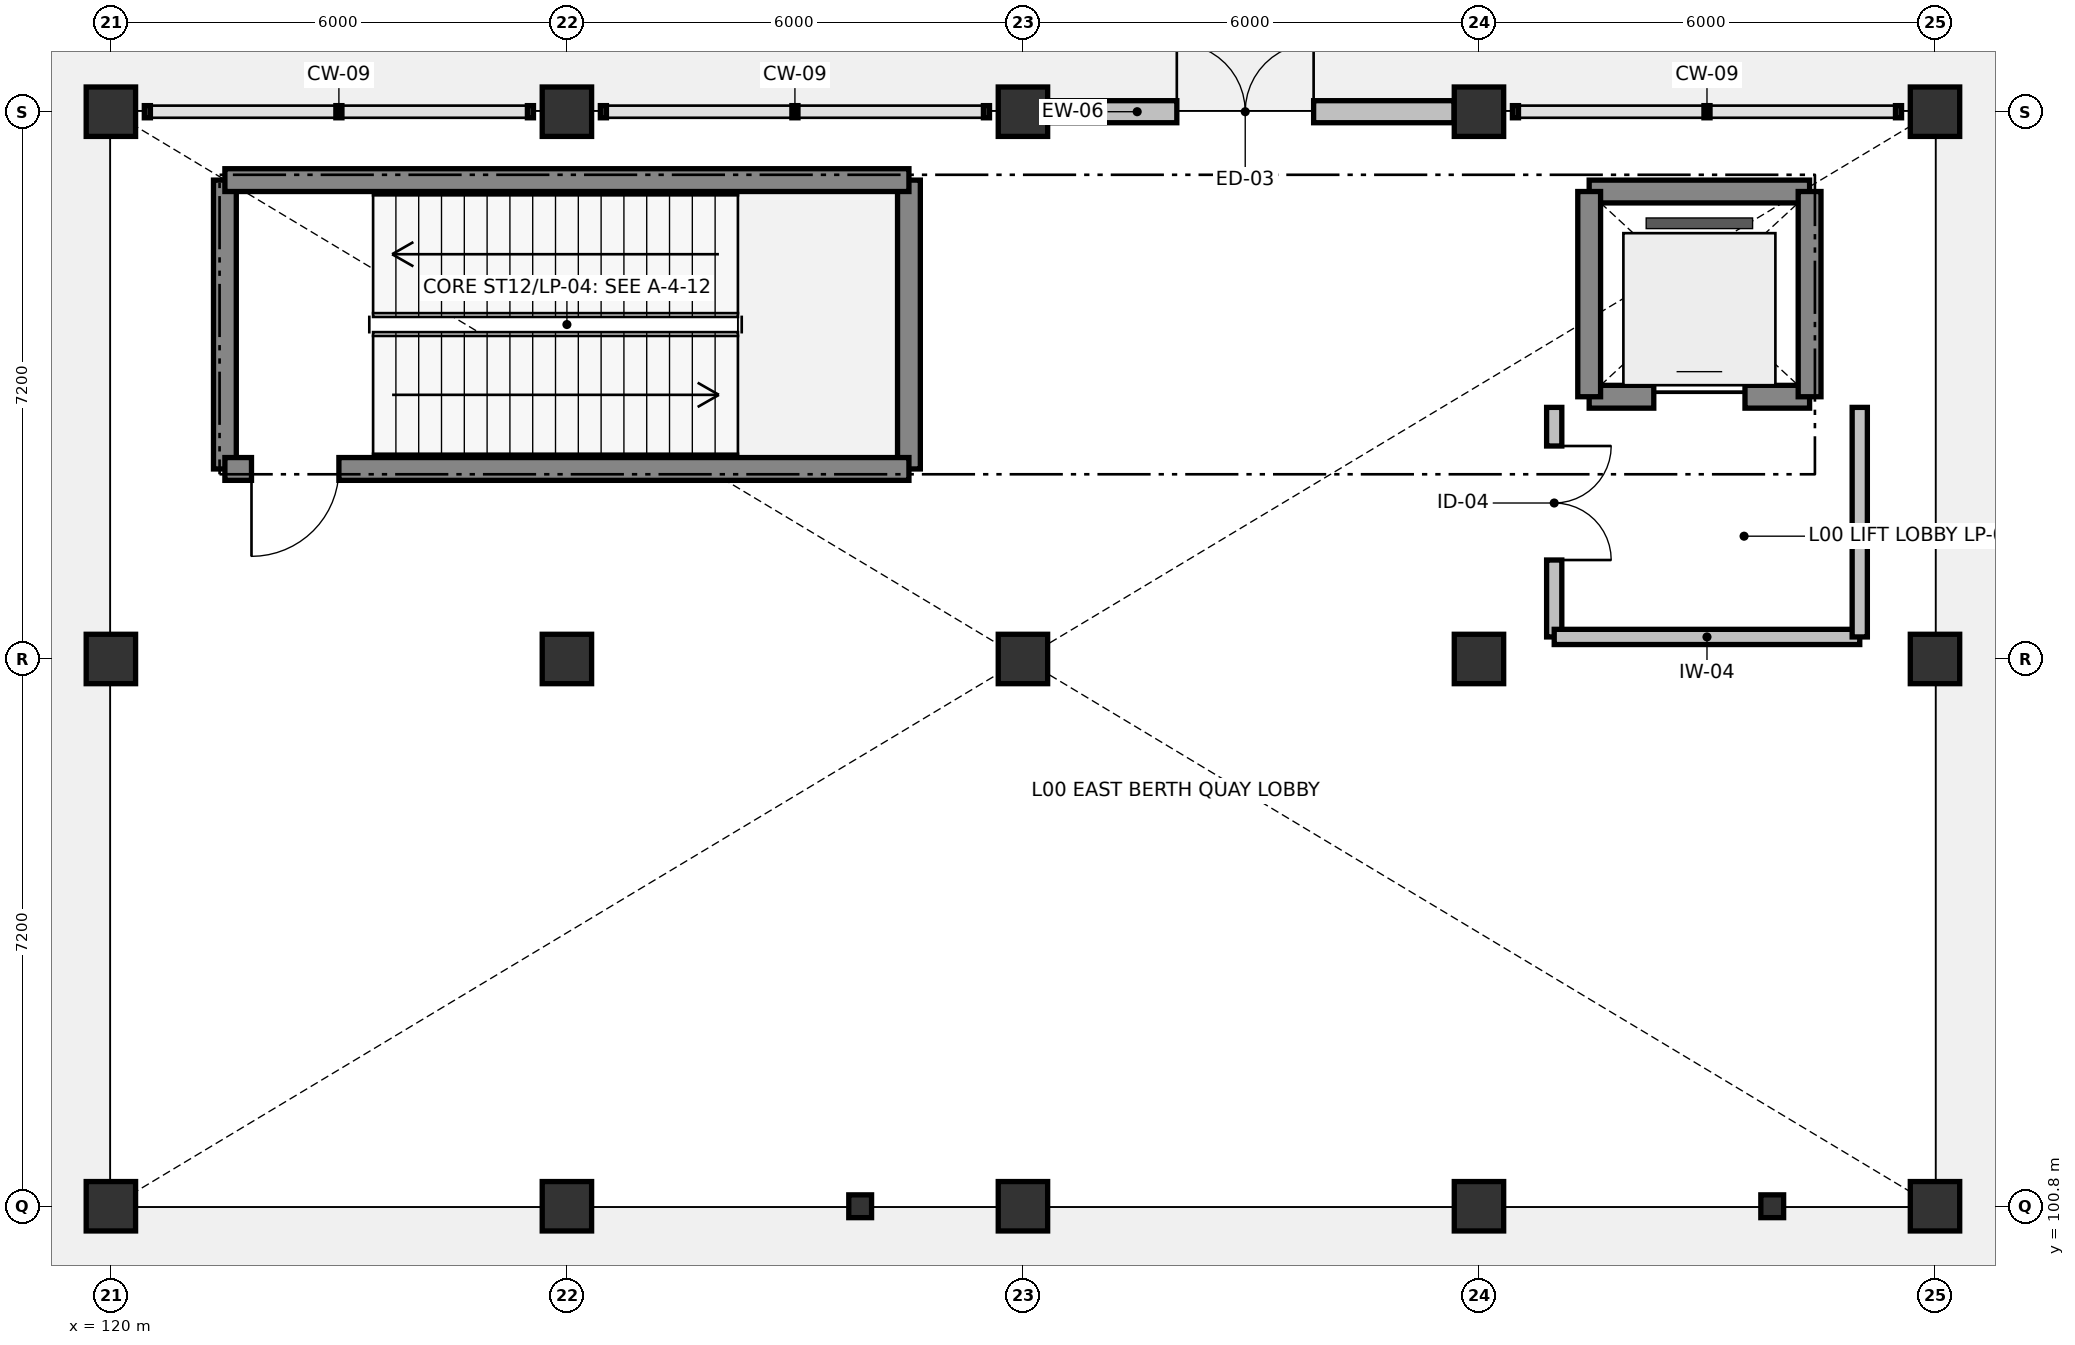
"""IFC4 building model, lengths in metres.
Left out: names, types, materials, properties, quantities, classifications, styles, units other than length and angle.
Written with IfcOpenShell. Run it as: python <this file> out.ifc"""

import sys

from ifc_helpers import new_model, si_unit, direction, frame, frame_2d, origin, origin_2d, place, context, subcontext, project, spatial, rectangle, hollow_rectangle, extrude, element, fill, save


model = new_model("IFC4")
c1 = context("Model", 3, precision=1e-05, world=origin(), true_north=direction((0.0, 1.0)))
c2 = subcontext(c1, "Body", "Model", "MODEL_VIEW")
j1 = project(units=[si_unit("LENGTHUNIT", "METRE"), si_unit("PLANEANGLEUNIT", "RADIAN")], contexts=[c1])
p1 = place(None, origin())
s1 = spatial("IfcSite", under=j1, at=p1, CompositionType="ELEMENT")
p2 = place(p1, origin())
s2 = spatial("IfcBuilding", under=s1, at=p2, CompositionType="ELEMENT")
p3 = place(p2, origin())
s3 = spatial("IfcBuildingStorey", under=s2, at=p3, CompositionType="ELEMENT", Elevation=0.0)
for number, where, z_axis, x_axis in (
    (1, (121.5, 110.5, -0.32), (0.0, 0.0, 1.0), (0.0, 1.0, 0.0)),
    (2, (130.5, 110.5, -0.32), (0.0, 0.0, 1.0), (0.0, 1.0, 0.0)),
):
    element("IfcWall", number, at=place(p3, frame(where, z_axis=z_axis, x_axis=x_axis)), inside=s3, PredefinedType="SHEAR", context=c2, shape_type="SweptSolid", body=[
        extrude(rectangle(XDim=3.8, YDim=0.3, at=frame_2d((1.9, 0.0))), origin(), (0.0, 0.0, 1.0), 6.08),
    ])
for number, where, z_axis, x_axis in (
    (3, (120.0, 100.8, -0.32), (0.0, 0.0, 1.0), (1.0, 0.0, 0.0)),
    (4, (120.0, 108.0, -0.32), (0.0, 0.0, 1.0), (1.0, 0.0, 0.0)),
    (5, (120.0, 115.2, -0.32), (0.0, 0.0, 1.0), (1.0, 0.0, 0.0)),
    (6, (126.0, 100.8, -0.32), (0.0, 0.0, 1.0), (1.0, 0.0, 0.0)),
    (7, (126.0, 108.0, -0.32), (0.0, 0.0, 1.0), (1.0, 0.0, 0.0)),
    (8, (126.0, 115.2, -0.32), (0.0, 0.0, 1.0), (1.0, 0.0, 0.0)),
    (9, (132.0, 100.8, -0.32), (0.0, 0.0, 1.0), (1.0, 0.0, 0.0)),
    (10, (132.0, 108.0, -0.32), (0.0, 0.0, 1.0), (1.0, 0.0, 0.0)),
    (11, (132.0, 115.2, -0.32), (0.0, 0.0, 1.0), (1.0, 0.0, 0.0)),
    (12, (138.0, 100.8, -0.32), (0.0, 0.0, 1.0), (1.0, 0.0, 0.0)),
    (13, (138.0, 108.0, -0.32), (0.0, 0.0, 1.0), (1.0, 0.0, 0.0)),
    (14, (138.0, 115.2, -0.32), (0.0, 0.0, 1.0), (1.0, 0.0, 0.0)),
    (15, (144.0, 100.8, -0.32), (0.0, 0.0, 1.0), (1.0, 0.0, 0.0)),
    (16, (144.0, 108.0, -0.32), (0.0, 0.0, 1.0), (1.0, 0.0, 0.0)),
    (17, (144.0, 115.2, -0.32), (0.0, 0.0, 1.0), (1.0, 0.0, 0.0)),
):
    element("IfcColumn", number, at=place(p3, frame(where, z_axis=z_axis, x_axis=x_axis)), inside=s3, PredefinedType="COLUMN", context=c2, shape_type="SweptSolid", body=[
        extrude(rectangle(XDim=0.65, YDim=0.65, at=origin_2d()), origin(), (0.0, 0.0, 1.0), 6.08),
    ])
for number, where, z_axis, x_axis in (
    (18, (129.858, 100.8, -0.32), (0.0, 0.0, 1.0), (1.0, 0.0, 0.0)),
    (19, (141.858, 100.8, -0.32), (0.0, 0.0, 1.0), (1.0, 0.0, 0.0)),
):
    element("IfcColumn", number, at=place(p3, frame(where, z_axis=z_axis, x_axis=x_axis)), inside=s3, PredefinedType="COLUMN", context=c2, shape_type="SweptSolid", body=[
        extrude(hollow_rectangle(XDim=0.3, YDim=0.3, WallThickness=0.012, InnerFilletRadius=0.012, OuterFilletRadius=0.025, at=origin_2d()), origin(), (0.0, 0.0, 1.0), 5.84),
    ])
p4 = place(p3, frame((132.327, 115.2, 0.0), z_axis=(0.0, 0.0, 1.0), x_axis=(1.0, 0.0, 0.0)))
e20 = element("IfcWall", 20, at=p4, inside=s3, PredefinedType="SOLIDWALL", context=c2, shape_type="SweptSolid", body=[
    extrude(rectangle(XDim=5.346, YDim=0.29, at=frame_2d((2.673, 0.0))), origin(), (0.0, 0.0, 1.0), 4.86),
])
p5 = place(p4, frame((1.698, 0.0, 0.0)))
e21 = element("IfcOpeningElement", 21, at=p5, cuts=e20, PredefinedType="OPENING", context=c2, shape_type="SweptSolid", body=[
    extrude(rectangle(XDim=1.8, YDim=2.25, at=frame_2d((0.9, 1.125))), frame((0.0, 0.155, 0.0), z_axis=(0.0, -1.0, 0.0), x_axis=(1.0, 0.0, 0.0)), (0.0, 0.0, 1.0), 0.31),
])
p6 = place(p3, frame((121.5, 114.3, -0.32), z_axis=(0.0, 0.0, 1.0), x_axis=(1.0, 0.0, 0.0)))
e22 = element("IfcWall", 22, at=p6, inside=s3, PredefinedType="SHEAR", context=c2, shape_type="SweptSolid", body=[
    extrude(rectangle(XDim=9.0, YDim=0.3, at=frame_2d((4.5, 0.0))), origin(), (0.0, 0.0, 1.0), 6.08),
])
p7 = place(p3, frame((121.5, 110.5, -0.32), z_axis=(0.0, 0.0, 1.0), x_axis=(1.0, 0.0, 0.0)))
e23 = element("IfcWall", 23, at=p7, inside=s3, PredefinedType="SHEAR", context=c2, shape_type="SweptSolid", body=[
    extrude(rectangle(XDim=9.0, YDim=0.3, at=frame_2d((4.5, 0.0))), origin(), (0.0, 0.0, 1.0), 6.08),
])
p8 = place(p7, frame((0.35, 0.0, 0.32)))
e24 = element("IfcOpeningElement", 24, at=p8, cuts=e23, PredefinedType="OPENING", context=c2, shape_type="SweptSolid", body=[
    extrude(rectangle(XDim=1.15, YDim=2.15, at=frame_2d((0.575, 1.075))), frame((0.0, 0.16, 0.0), z_axis=(0.0, -1.0, 0.0), x_axis=(1.0, 0.0, 0.0)), (0.0, 0.0, 1.0), 0.32),
])
p9 = place(p3, frame((139.45, 111.45, -0.32), z_axis=(0.0, 0.0, 1.0), x_axis=(1.0, 0.0, 0.0)))
e25 = element("IfcWall", 25, at=p9, inside=s3, PredefinedType="SHEAR", context=c2, shape_type="SweptSolid", body=[
    extrude(rectangle(XDim=2.9, YDim=0.3, at=frame_2d((1.45, 0.0))), origin(), (0.0, 0.0, 1.0), 6.08),
])
p10 = place(p9, frame((0.85, 0.0, 0.32)))
e26 = element("IfcOpeningElement", 26, at=p10, cuts=e25, PredefinedType="OPENING", context=c2, shape_type="SweptSolid", body=[
    extrude(rectangle(XDim=1.2, YDim=2.15, at=frame_2d((0.6, 1.075))), frame((0.0, 0.16, 0.0), z_axis=(0.0, -1.0, 0.0), x_axis=(1.0, 0.0, 0.0)), (0.0, 0.0, 1.0), 0.32),
])
p11 = place(p3, frame((139.45, 114.15, -0.32), z_axis=(0.0, 0.0, 1.0), x_axis=(1.0, 0.0, 0.0)))
e27 = element("IfcWall", 27, at=p11, inside=s3, PredefinedType="SHEAR", context=c2, shape_type="SweptSolid", body=[
    extrude(rectangle(XDim=2.9, YDim=0.3, at=frame_2d((1.45, 0.0))), origin(), (0.0, 0.0, 1.0), 6.08),
])
for number, where, z_axis, x_axis in (
    (28, (139.45, 111.45, -0.32), (0.0, 0.0, 1.0), (0.0, 1.0, 0.0)),
    (29, (142.35, 111.45, -0.32), (0.0, 0.0, 1.0), (0.0, 1.0, 0.0)),
):
    element("IfcWall", number, at=place(p3, frame(where, z_axis=z_axis, x_axis=x_axis)), inside=s3, PredefinedType="SHEAR", context=c2, shape_type="SweptSolid", body=[
        extrude(rectangle(XDim=2.7, YDim=0.3, at=frame_2d((1.35, 0.0))), origin(), (0.0, 0.0, 1.0), 6.08),
    ])
p12 = place(p3, frame((138.99, 111.31, 0.0), z_axis=(0.0, 0.0, 1.0), x_axis=(0.0, -1.0, 0.0)))
e30 = element("IfcWall", 30, at=p12, inside=s3, PredefinedType="PARTITIONING", context=c2, shape_type="SweptSolid", body=[
    extrude(rectangle(XDim=3.02, YDim=0.2, at=frame_2d((1.51, 0.0))), origin(), (0.0, 0.0, 1.0), 5.5),
])
p13 = place(p12, frame((0.508, 0.0, 0.0)))
e31 = element("IfcOpeningElement", 31, at=p13, cuts=e30, PredefinedType="OPENING", context=c2, shape_type="SweptSolid", body=[
    extrude(rectangle(XDim=1.5, YDim=2.2, at=frame_2d((0.75, 1.1))), frame((0.0, 0.11, 0.0), z_axis=(0.0, -1.0, 0.0), x_axis=(1.0, 0.0, 0.0)), (0.0, 0.0, 1.0), 0.22),
])
p14 = place(p3, frame((138.99, 108.29, 0.0), z_axis=(0.0, 0.0, 1.0), x_axis=(1.0, 0.0, 0.0)))
e32 = element("IfcWall", 32, at=p14, inside=s3, PredefinedType="PARTITIONING", context=c2, shape_type="SweptSolid", body=[
    extrude(rectangle(XDim=4.02, YDim=0.2, at=frame_2d((2.01, 0.0))), origin(), (0.0, 0.0, 1.0), 4.86),
])
p15 = place(p3, frame((143.01, 108.29, 0.0), z_axis=(0.0, 0.0, 1.0), x_axis=(0.0, 1.0, 0.0)))
e33 = element("IfcWall", 33, at=p15, inside=s3, PredefinedType="PARTITIONING", context=c2, shape_type="SweptSolid", body=[
    extrude(rectangle(XDim=3.02, YDim=0.2, at=frame_2d((1.51, 0.0))), origin(), (0.0, 0.0, 1.0), 5.5),
])
p16 = place(p5, origin())
e34 = element("IfcDoor", 34, at=p16, inside=s3, OperationType="DOUBLE_SWING_LEFT", PredefinedType="DOOR", context=c2, shape_type="SweptSolid", body=[
    extrude(rectangle(XDim=1.8, YDim=2.25, at=frame_2d((0.9, 1.125))), frame((0.0, 0.025, 0.0), z_axis=(0.0, -1.0, 0.0), x_axis=(1.0, 0.0, 0.0)), (0.0, 0.0, 1.0), 0.05),
])
fill(e21, e34)
p17 = place(p8, frame((1.15, 0.0, 0.0), z_axis=(0.0, 0.0, 1.0), x_axis=(-1.0, 0.0, 0.0)))
e35 = element("IfcDoor", 35, at=p17, inside=s3, OperationType="SINGLE_SWING_RIGHT", PredefinedType="DOOR", context=c2, shape_type="SweptSolid", body=[
    extrude(rectangle(XDim=1.15, YDim=2.15, at=frame_2d((0.575, 1.075))), frame((0.0, 0.025, 0.0), z_axis=(0.0, -1.0, 0.0), x_axis=(1.0, 0.0, 0.0)), (0.0, 0.0, 1.0), 0.05),
])
fill(e24, e35)
p18 = place(p10, origin())
e36 = element("IfcDoor", 36, at=p18, inside=s3, OperationType="SLIDING_TO_LEFT", PredefinedType="DOOR", context=c2, shape_type="SweptSolid", body=[
    extrude(rectangle(XDim=1.2, YDim=2.15, at=frame_2d((0.6, 1.075))), frame((0.0, 0.025, 0.0), z_axis=(0.0, -1.0, 0.0), x_axis=(1.0, 0.0, 0.0)), (0.0, 0.0, 1.0), 0.05),
])
fill(e26, e36)
p19 = place(p13, origin())
e37 = element("IfcDoor", 37, at=p19, inside=s3, OperationType="DOUBLE_SWING_LEFT", PredefinedType="DOOR", context=c2, shape_type="SweptSolid", body=[
    extrude(rectangle(XDim=1.5, YDim=2.2, at=frame_2d((0.75, 1.1))), frame((0.0, 0.025, 0.0), z_axis=(0.0, -1.0, 0.0), x_axis=(1.0, 0.0, 0.0)), (0.0, 0.0, 1.0), 0.05),
])
fill(e31, e37)
save(model, sys.argv[1])
